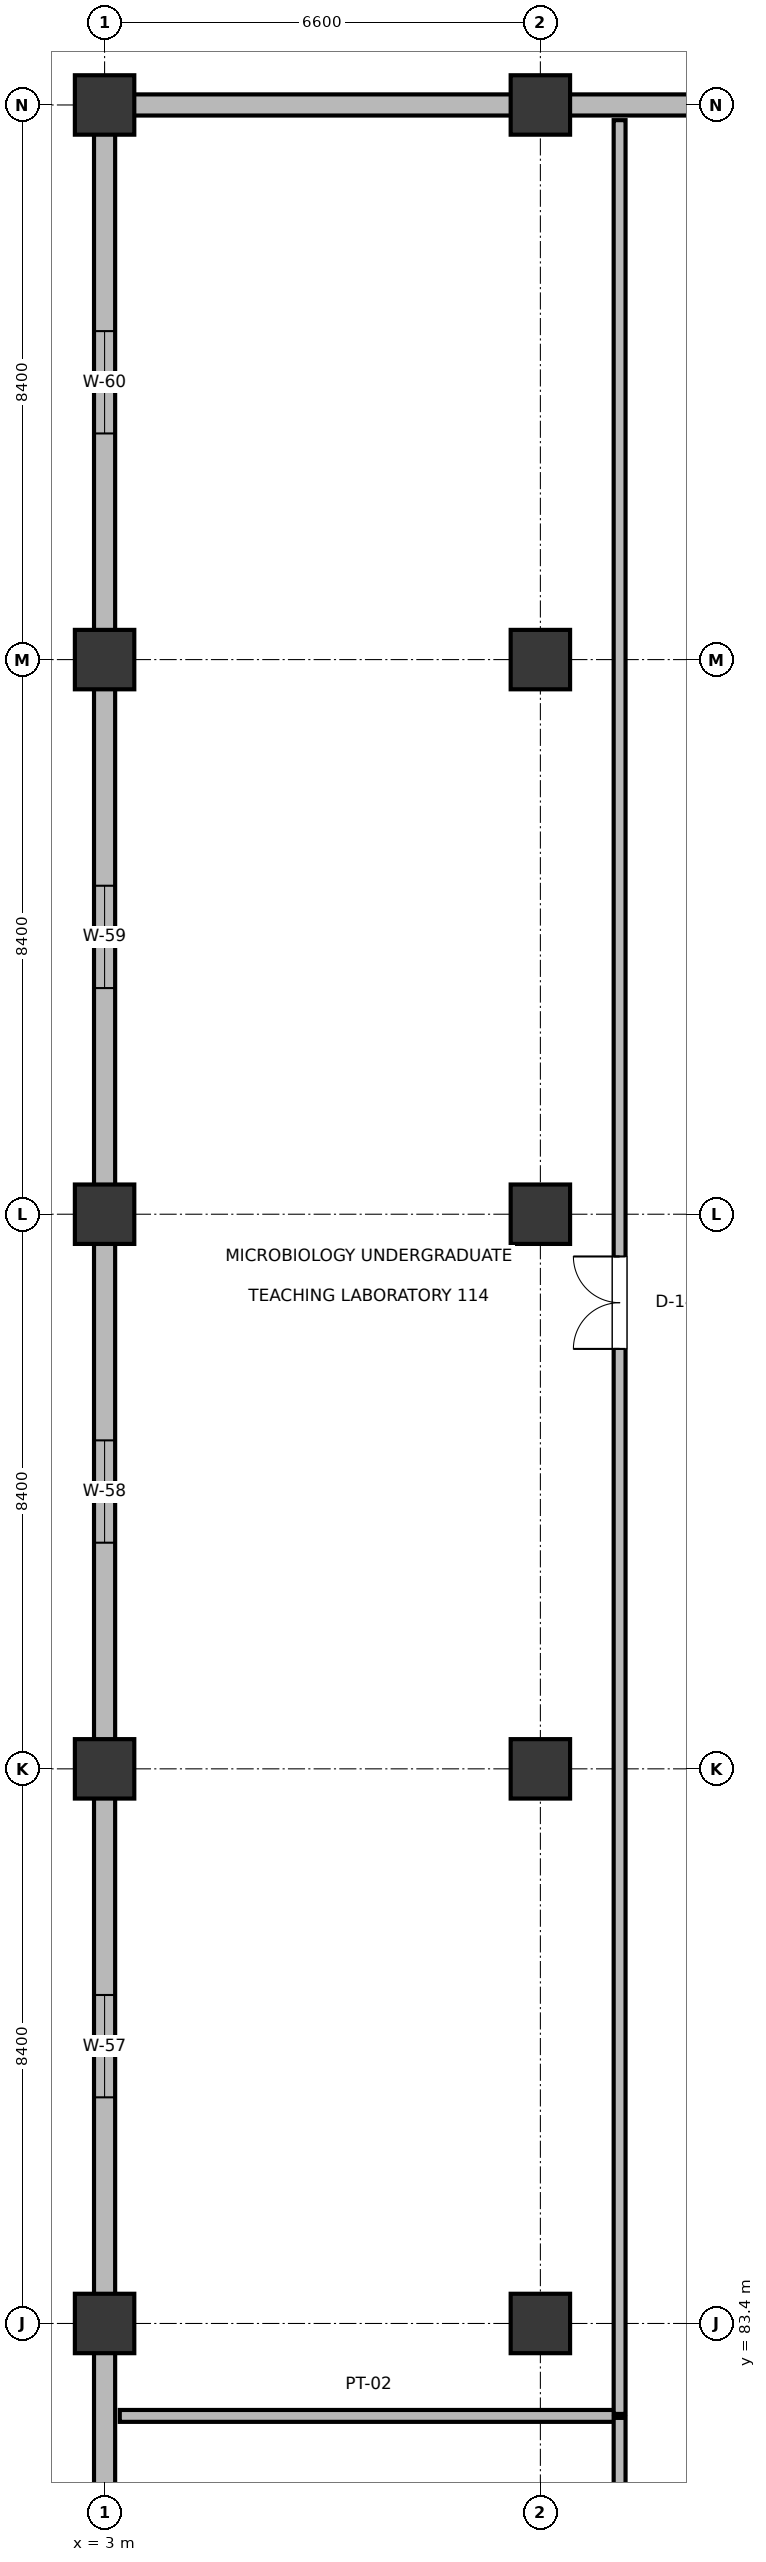
"""IFC4 building model, lengths in metres.
Left out: names, types, materials, properties, quantities, classifications, styles, units other than length and angle.
Written with IfcOpenShell. Run it as: python <this file> out.ifc"""

import sys

from ifc_helpers import new_model, si_unit, direction, frame, frame_2d, origin, origin_2d, place, context, subcontext, project, spatial, rectangle, extrude, element, fill, save


model = new_model("IFC4")
c1 = context("Model", 3, precision=1e-05, world=origin(), true_north=direction((0.0, 1.0)))
c2 = subcontext(c1, "Body", "Model", "MODEL_VIEW")
j1 = project(units=[si_unit("LENGTHUNIT", "METRE"), si_unit("PLANEANGLEUNIT", "RADIAN")], contexts=[c1])
p1 = place(None, origin())
s1 = spatial("IfcSite", under=j1, at=p1, CompositionType="ELEMENT")
p2 = place(p1, origin())
s2 = spatial("IfcBuilding", under=s1, at=p2, CompositionType="ELEMENT")
p3 = place(p2, frame((0.0, 0.0, 5.4)))
s3 = spatial("IfcBuildingStorey", under=s2, at=p3, CompositionType="ELEMENT", Elevation=5.4)
for number, where, z_axis, x_axis in (
    (1, (3.0, 83.4, 0.0), (0.0, 0.0, 1.0), (1.0, 0.0, 0.0)),
    (2, (3.0, 91.8, 0.0), (0.0, 0.0, 1.0), (1.0, 0.0, 0.0)),
    (3, (3.0, 100.2, 0.0), (0.0, 0.0, 1.0), (1.0, 0.0, 0.0)),
    (4, (3.0, 108.6, 0.0), (0.0, 0.0, 1.0), (1.0, 0.0, 0.0)),
    (5, (3.0, 117.0, 0.0), (0.0, 0.0, 1.0), (1.0, 0.0, 0.0)),
    (6, (9.6, 83.4, 0.0), (0.0, 0.0, 1.0), (1.0, 0.0, 0.0)),
    (7, (9.6, 91.8, 0.0), (0.0, 0.0, 1.0), (1.0, 0.0, 0.0)),
    (8, (9.6, 100.2, 0.0), (0.0, 0.0, 1.0), (1.0, 0.0, 0.0)),
    (9, (9.6, 108.6, 0.0), (0.0, 0.0, 1.0), (1.0, 0.0, 0.0)),
    (10, (9.6, 117.0, 0.0), (0.0, 0.0, 1.0), (1.0, 0.0, 0.0)),
):
    element("IfcColumn", number, at=place(p3, frame(where, z_axis=z_axis, x_axis=x_axis)), inside=s3, PredefinedType="COLUMN", context=c2, shape_type="SweptSolid", body=[
        extrude(rectangle(XDim=0.9, YDim=0.9, at=origin_2d()), origin(), (0.0, 0.0, 1.0), 4.8),
    ])
p4 = place(p3, frame((3.0, 76.635, 0.0), z_axis=(0.0, 0.0, 1.0), x_axis=(0.0, 1.0, 0.0)))
e11 = element("IfcWall", 11, at=p4, inside=s3, PredefinedType="SOLIDWALL", context=c2, shape_type="SweptSolid", body=[
    extrude(rectangle(XDim=6.33, YDim=0.32, at=frame_2d((3.165, 0.0))), origin(), (0.0, 0.0, 1.0), 3.775),
])
p5 = place(p4, frame((2.49, 0.0, 0.9)))
e12 = element("IfcOpeningElement", 12, at=p5, cuts=e11, PredefinedType="OPENING", context=c2, shape_type="SweptSolid", body=[
    extrude(rectangle(XDim=1.35, YDim=1.75, at=frame_2d((0.675, 0.875))), frame((0.0, 0.17, 0.0), z_axis=(0.0, -1.0, 0.0), x_axis=(1.0, 0.0, 0.0)), (0.0, 0.0, 1.0), 0.34),
])
p6 = place(p3, frame((3.0, 83.835, 0.0), z_axis=(0.0, 0.0, 1.0), x_axis=(0.0, 1.0, 0.0)))
e13 = element("IfcWall", 13, at=p6, inside=s3, PredefinedType="SOLIDWALL", context=c2, shape_type="SweptSolid", body=[
    extrude(rectangle(XDim=7.53, YDim=0.32, at=frame_2d((3.765, 0.0))), origin(), (0.0, 0.0, 1.0), 3.775),
])
p7 = place(p6, frame((2.99, 0.0, 0.9)))
e14 = element("IfcOpeningElement", 14, at=p7, cuts=e13, PredefinedType="OPENING", context=c2, shape_type="SweptSolid", body=[
    extrude(rectangle(XDim=1.55, YDim=1.15, at=frame_2d((0.775, 0.575))), frame((0.0, 0.17, 0.0), z_axis=(0.0, -1.0, 0.0), x_axis=(1.0, 0.0, 0.0)), (0.0, 0.0, 1.0), 0.34),
])
p8 = place(p3, frame((3.0, 92.235, 0.0), z_axis=(0.0, 0.0, 1.0), x_axis=(0.0, 1.0, 0.0)))
e15 = element("IfcWall", 15, at=p8, inside=s3, PredefinedType="SOLIDWALL", context=c2, shape_type="SweptSolid", body=[
    extrude(rectangle(XDim=7.53, YDim=0.32, at=frame_2d((3.765, 0.0))), origin(), (0.0, 0.0, 1.0), 3.775),
])
p9 = place(p8, frame((2.99, 0.0, 0.9)))
e16 = element("IfcOpeningElement", 16, at=p9, cuts=e15, PredefinedType="OPENING", context=c2, shape_type="SweptSolid", body=[
    extrude(rectangle(XDim=1.55, YDim=1.35, at=frame_2d((0.775, 0.675))), frame((0.0, 0.17, 0.0), z_axis=(0.0, -1.0, 0.0), x_axis=(1.0, 0.0, 0.0)), (0.0, 0.0, 1.0), 0.34),
])
p10 = place(p3, frame((3.0, 100.635, 0.0), z_axis=(0.0, 0.0, 1.0), x_axis=(0.0, 1.0, 0.0)))
e17 = element("IfcWall", 17, at=p10, inside=s3, PredefinedType="SOLIDWALL", context=c2, shape_type="SweptSolid", body=[
    extrude(rectangle(XDim=7.53, YDim=0.32, at=frame_2d((3.765, 0.0))), origin(), (0.0, 0.0, 1.0), 3.775),
])
p11 = place(p10, frame((2.99, 0.0, 0.9)))
e18 = element("IfcOpeningElement", 18, at=p11, cuts=e17, PredefinedType="OPENING", context=c2, shape_type="SweptSolid", body=[
    extrude(rectangle(XDim=1.55, YDim=1.55, at=frame_2d((0.775, 0.775))), frame((0.0, 0.17, 0.0), z_axis=(0.0, -1.0, 0.0), x_axis=(1.0, 0.0, 0.0)), (0.0, 0.0, 1.0), 0.34),
])
p12 = place(p3, frame((3.0, 109.035, 0.0), z_axis=(0.0, 0.0, 1.0), x_axis=(0.0, 1.0, 0.0)))
e19 = element("IfcWall", 19, at=p12, inside=s3, PredefinedType="SOLIDWALL", context=c2, shape_type="SweptSolid", body=[
    extrude(rectangle(XDim=7.53, YDim=0.32, at=frame_2d((3.765, 0.0))), origin(), (0.0, 0.0, 1.0), 3.775),
])
p13 = place(p12, frame((2.99, 0.0, 0.9)))
e20 = element("IfcOpeningElement", 20, at=p13, cuts=e19, PredefinedType="OPENING", context=c2, shape_type="SweptSolid", body=[
    extrude(rectangle(XDim=1.55, YDim=1.75, at=frame_2d((0.775, 0.875))), frame((0.0, 0.17, 0.0), z_axis=(0.0, -1.0, 0.0), x_axis=(1.0, 0.0, 0.0)), (0.0, 0.0, 1.0), 0.34),
])
p14 = place(p3, frame((3.435, 117.0, 0.0), z_axis=(0.0, 0.0, 1.0), x_axis=(1.0, 0.0, 0.0)))
e21 = element("IfcWall", 21, at=p14, inside=s3, PredefinedType="SOLIDWALL", context=c2, shape_type="SweptSolid", body=[
    extrude(rectangle(XDim=18.93, YDim=0.32, at=frame_2d((9.465, 0.0))), origin(), (0.0, 0.0, 1.0), 3.775),
])
p15 = place(p14, frame((8.39, 0.0, 0.95)))
e22 = element("IfcOpeningElement", 22, at=p15, cuts=e21, PredefinedType="OPENING", context=c2, shape_type="SweptSolid", body=[
    extrude(rectangle(XDim=2.15, YDim=1.15, at=frame_2d((1.075, 0.575))), frame((0.0, 0.17, 0.0), z_axis=(0.0, -1.0, 0.0), x_axis=(1.0, 0.0, 0.0)), (0.0, 0.0, 1.0), 0.34),
])
p16 = place(p3, frame((3.23, 82.0, 0.0), z_axis=(0.0, 0.0, 1.0), x_axis=(1.0, 0.0, 0.0)))
e23 = element("IfcWall", 23, at=p16, inside=s3, PredefinedType="PARTITIONING", context=c2, shape_type="SweptSolid", body=[
    extrude(rectangle(XDim=7.54, YDim=0.18, at=frame_2d((3.77, 0.0))), origin(), (0.0, 0.0, 1.0), 3.775),
])
p17 = place(p3, frame((10.8, 50.03, 0.0), z_axis=(0.0, 0.0, 1.0), x_axis=(0.0, 1.0, 0.0)))
e24 = element("IfcWall", 24, at=p17, inside=s3, PredefinedType="PARTITIONING", context=c2, shape_type="SweptSolid", body=[
    extrude(rectangle(XDim=31.94, YDim=0.18, at=frame_2d((15.97, 0.0))), origin(), (0.0, 0.0, 1.0), 3.655),
])
p18 = place(p17, frame((15.99, 0.0, 0.0)))
e25 = element("IfcOpeningElement", 25, at=p18, cuts=e24, PredefinedType="OPENING", context=c2, shape_type="SweptSolid", body=[
    extrude(rectangle(XDim=1.4, YDim=2.2, at=frame_2d((0.7, 1.1))), frame((0.0, 0.1, 0.0), z_axis=(0.0, -1.0, 0.0), x_axis=(1.0, 0.0, 0.0)), (0.0, 0.0, 1.0), 0.2),
])
p19 = place(p3, frame((10.8, 82.03, 0.0), z_axis=(0.0, 0.0, 1.0), x_axis=(0.0, 1.0, 0.0)))
e26 = element("IfcWall", 26, at=p19, inside=s3, PredefinedType="PARTITIONING", context=c2, shape_type="SweptSolid", body=[
    extrude(rectangle(XDim=34.74, YDim=0.18, at=frame_2d((17.37, 0.0))), origin(), (0.0, 0.0, 1.0), 3.675),
])
p20 = place(p19, frame((16.13, 0.0, 0.0)))
e27 = element("IfcOpeningElement", 27, at=p20, cuts=e26, PredefinedType="OPENING", context=c2, shape_type="SweptSolid", body=[
    extrude(rectangle(XDim=1.4, YDim=2.2, at=frame_2d((0.7, 1.1))), frame((0.0, 0.1, 0.0), z_axis=(0.0, -1.0, 0.0), x_axis=(1.0, 0.0, 0.0)), (0.0, 0.0, 1.0), 0.2),
])
p21 = place(p7, origin())
e28 = element("IfcWindow", 28, at=p21, inside=s3, PartitioningType="DOUBLE_PANEL_VERTICAL", PredefinedType="WINDOW", context=c2, shape_type="SweptSolid", body=[
    extrude(rectangle(XDim=1.55, YDim=1.15, at=frame_2d((0.775, 0.575))), frame((0.0, 0.03, 0.0), z_axis=(0.0, -1.0, 0.0), x_axis=(1.0, 0.0, 0.0)), (0.0, 0.0, 1.0), 0.06),
])
fill(e14, e28)
p22 = place(p9, origin())
e29 = element("IfcWindow", 29, at=p22, inside=s3, PartitioningType="DOUBLE_PANEL_VERTICAL", PredefinedType="WINDOW", context=c2, shape_type="SweptSolid", body=[
    extrude(rectangle(XDim=1.55, YDim=1.35, at=frame_2d((0.775, 0.675))), frame((0.0, 0.03, 0.0), z_axis=(0.0, -1.0, 0.0), x_axis=(1.0, 0.0, 0.0)), (0.0, 0.0, 1.0), 0.06),
])
fill(e16, e29)
p23 = place(p11, origin())
e30 = element("IfcWindow", 30, at=p23, inside=s3, PartitioningType="DOUBLE_PANEL_VERTICAL", PredefinedType="WINDOW", context=c2, shape_type="SweptSolid", body=[
    extrude(rectangle(XDim=1.55, YDim=1.55, at=frame_2d((0.775, 0.775))), frame((0.0, 0.03, 0.0), z_axis=(0.0, -1.0, 0.0), x_axis=(1.0, 0.0, 0.0)), (0.0, 0.0, 1.0), 0.06),
])
fill(e18, e30)
p24 = place(p13, origin())
e31 = element("IfcWindow", 31, at=p24, inside=s3, PartitioningType="DOUBLE_PANEL_VERTICAL", PredefinedType="WINDOW", context=c2, shape_type="SweptSolid", body=[
    extrude(rectangle(XDim=1.55, YDim=1.75, at=frame_2d((0.775, 0.875))), frame((0.0, 0.03, 0.0), z_axis=(0.0, -1.0, 0.0), x_axis=(1.0, 0.0, 0.0)), (0.0, 0.0, 1.0), 0.06),
])
fill(e20, e31)
p25 = place(p20, origin())
e32 = element("IfcDoor", 32, at=p25, inside=s3, OperationType="DOUBLE_DOOR_SINGLE_SWING", PredefinedType="DOOR", context=c2, shape_type="SweptSolid", body=[
    extrude(rectangle(XDim=1.4, YDim=2.2, at=frame_2d((0.7, 1.1))), frame((0.0, 0.025, 0.0), z_axis=(0.0, -1.0, 0.0), x_axis=(1.0, 0.0, 0.0)), (0.0, 0.0, 1.0), 0.05),
])
fill(e27, e32)
save(model, sys.argv[1])
